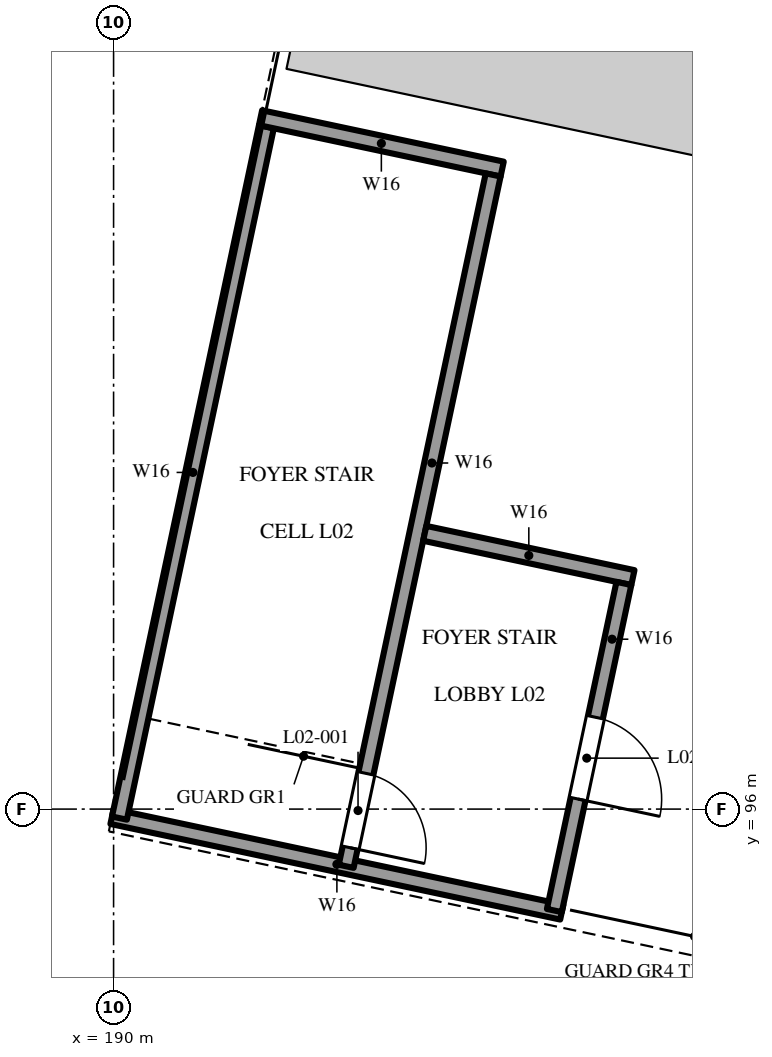
"""IFC4 building model, lengths in metres.
Left out: names, types, materials, properties, quantities, classifications, styles, units other than length and angle.
Written with IfcOpenShell. Run it as: python <this file> out.ifc"""

import sys

from ifc_helpers import new_model, si_unit, direction, frame, frame_2d, origin, place, context, subcontext, project, spatial, rectangle, extrude, element, fill, save


model = new_model("IFC4")
c1 = context("Model", 3, precision=1e-05, world=origin(), true_north=direction((0.0, 1.0)))
c2 = subcontext(c1, "Body", "Model", "MODEL_VIEW")
j1 = project(units=[si_unit("LENGTHUNIT", "METRE"), si_unit("PLANEANGLEUNIT", "RADIAN")], contexts=[c1])
p1 = place(None, origin())
s1 = spatial("IfcSite", under=j1, at=p1, CompositionType="ELEMENT")
p2 = place(p1, origin())
s2 = spatial("IfcBuilding", under=s1, at=p2, CompositionType="ELEMENT")
p3 = place(p2, frame((0.0, 0.0, 7.2)))
s3 = spatial("IfcBuildingStorey", under=s2, at=p3, CompositionType="ELEMENT", Elevation=7.2)
p4 = place(p3, frame((189.75, 96.0, 0.0), z_axis=(0.0, 0.0, 1.0), x_axis=(0.0, 1.0, 0.0)))
e1 = element("IfcWall", 1, at=p4, inside=s3, PredefinedType="SOLIDWALL", context=c2, shape_type="SweptSolid", body=[
    extrude(rectangle(XDim=46.0, YDim=0.5, at=frame_2d((23.0, 0.0))), origin(), (0.0, 0.0, 1.0), 6.6),
])
p5 = place(p2, frame((0.0, 0.0, 12.0)))
s4 = spatial("IfcBuildingStorey", under=s2, at=p5, CompositionType="ELEMENT", Elevation=12.0)
p6 = place(p5, frame((189.979, 95.902, 0.0), z_axis=(0.0, 0.0, 1.0), x_axis=(0.978148901478, -0.207905571204, 0.0)))
e2 = element("IfcWall", 2, at=p6, inside=s4, PredefinedType="SOLIDWALL", context=c2, shape_type="SweptSolid", body=[
    extrude(rectangle(XDim=6.05, YDim=0.2, at=frame_2d((3.025, 0.0))), origin(), (0.0, 0.0, 1.0), 3.2),
])
p7 = place(p5, frame((190.077, 95.881, 0.0), z_axis=(0.0, 0.0, 1.0), x_axis=(0.207909931549, 0.978147974676, 0.0)))
e3 = element("IfcWall", 3, at=p7, inside=s4, PredefinedType="SOLIDWALL", context=c2, shape_type="SweptSolid", body=[
    extrude(rectangle(XDim=9.3, YDim=0.2, at=frame_2d((4.65, 0.0))), origin(), (0.0, 0.0, 1.0), 3.2),
])
p8 = place(p5, frame((191.934, 105.097, 0.0), z_axis=(0.0, 0.0, 1.0), x_axis=(0.978158278153, -0.207861451167, 0.0)))
e4 = element("IfcWall", 4, at=p8, inside=s4, PredefinedType="SOLIDWALL", context=c2, shape_type="SweptSolid", body=[
    extrude(rectangle(XDim=3.25, YDim=0.2, at=frame_2d((1.625, 0.0))), origin(), (0.0, 0.0, 1.0), 3.2),
])
p9 = place(p5, frame((193.06, 95.247, 0.0), z_axis=(0.0, 0.0, 1.0), x_axis=(0.207915270313, 0.978146839882, 0.0)))
e5 = element("IfcWall", 5, at=p9, inside=s4, PredefinedType="SOLIDWALL", context=c2, shape_type="SweptSolid", body=[
    extrude(rectangle(XDim=9.3, YDim=0.2, at=frame_2d((4.65, 0.0))), origin(), (0.0, 0.0, 1.0), 3.2),
])
p10 = place(p9, frame((0.25, 0.0, 0.0)))
e6 = element("IfcOpeningElement", 6, at=p10, cuts=e5, PredefinedType="OPENING", context=c2, shape_type="SweptSolid", body=[
    extrude(rectangle(XDim=1.0, YDim=2.1, at=frame_2d((0.5, 1.05))), frame((0.0, 0.11, 0.0), z_axis=(0.0, -1.0, 0.0), x_axis=(1.0, 0.0, 0.0)), (0.0, 0.0, 1.0), 0.22),
])
p11 = place(p5, frame((194.094, 99.628, 0.0), z_axis=(0.0, 0.0, 1.0), x_axis=(0.978138015478, -0.207956780791, 0.0)))
e7 = element("IfcWall", 7, at=p11, inside=s4, PredefinedType="SOLIDWALL", context=c2, shape_type="SweptSolid", body=[
    extrude(rectangle(XDim=2.8, YDim=0.2, at=frame_2d((1.4, 0.0))), origin(), (0.0, 0.0, 1.0), 3.2),
])
p12 = place(p5, frame((195.799, 94.665, 0.0), z_axis=(0.0, 0.0, 1.0), x_axis=(0.207956302845, 0.978138117091, 0.0)))
e8 = element("IfcWall", 8, at=p12, inside=s4, PredefinedType="SOLIDWALL", context=c2, shape_type="SweptSolid", body=[
    extrude(rectangle(XDim=4.4, YDim=0.2, at=frame_2d((2.2, 0.0))), origin(), (0.0, 0.0, 1.0), 3.2),
])
p13 = place(p12, frame((1.5, 0.0, 0.0)))
e9 = element("IfcOpeningElement", 9, at=p13, cuts=e8, PredefinedType="OPENING", context=c2, shape_type="SweptSolid", body=[
    extrude(rectangle(XDim=1.1, YDim=2.1, at=frame_2d((0.55, 1.05))), frame((0.0, 0.11, 0.0), z_axis=(0.0, -1.0, 0.0), x_axis=(1.0, 0.0, 0.0)), (0.0, 0.0, 1.0), 0.22),
])
p14 = place(p10, frame((1.0, 0.0, 0.0), z_axis=(0.0, 0.0, 1.0), x_axis=(-1.0, 0.0, 0.0)))
e10 = element("IfcDoor", 10, at=p14, inside=s4, OperationType="SINGLE_SWING_RIGHT", PredefinedType="DOOR", context=c2, shape_type="SweptSolid", body=[
    extrude(rectangle(XDim=1.0, YDim=2.1, at=frame_2d((0.5, 1.05))), frame((0.0, 0.025, 0.0), z_axis=(0.0, -1.0, 0.0), x_axis=(1.0, 0.0, 0.0)), (0.0, 0.0, 1.0), 0.05),
])
fill(e6, e10)
p15 = place(p13, frame((1.1, 0.0, 0.0), z_axis=(0.0, 0.0, 1.0), x_axis=(-1.0, 0.0, 0.0)))
e11 = element("IfcDoor", 11, at=p15, inside=s4, OperationType="SINGLE_SWING_LEFT", PredefinedType="DOOR", context=c2, shape_type="SweptSolid", body=[
    extrude(rectangle(XDim=1.1, YDim=2.1, at=frame_2d((0.55, 1.05))), frame((0.0, 0.025, 0.0), z_axis=(0.0, -1.0, 0.0), x_axis=(1.0, 0.0, 0.0)), (0.0, 0.0, 1.0), 0.05),
])
fill(e9, e11)
save(model, sys.argv[1])
